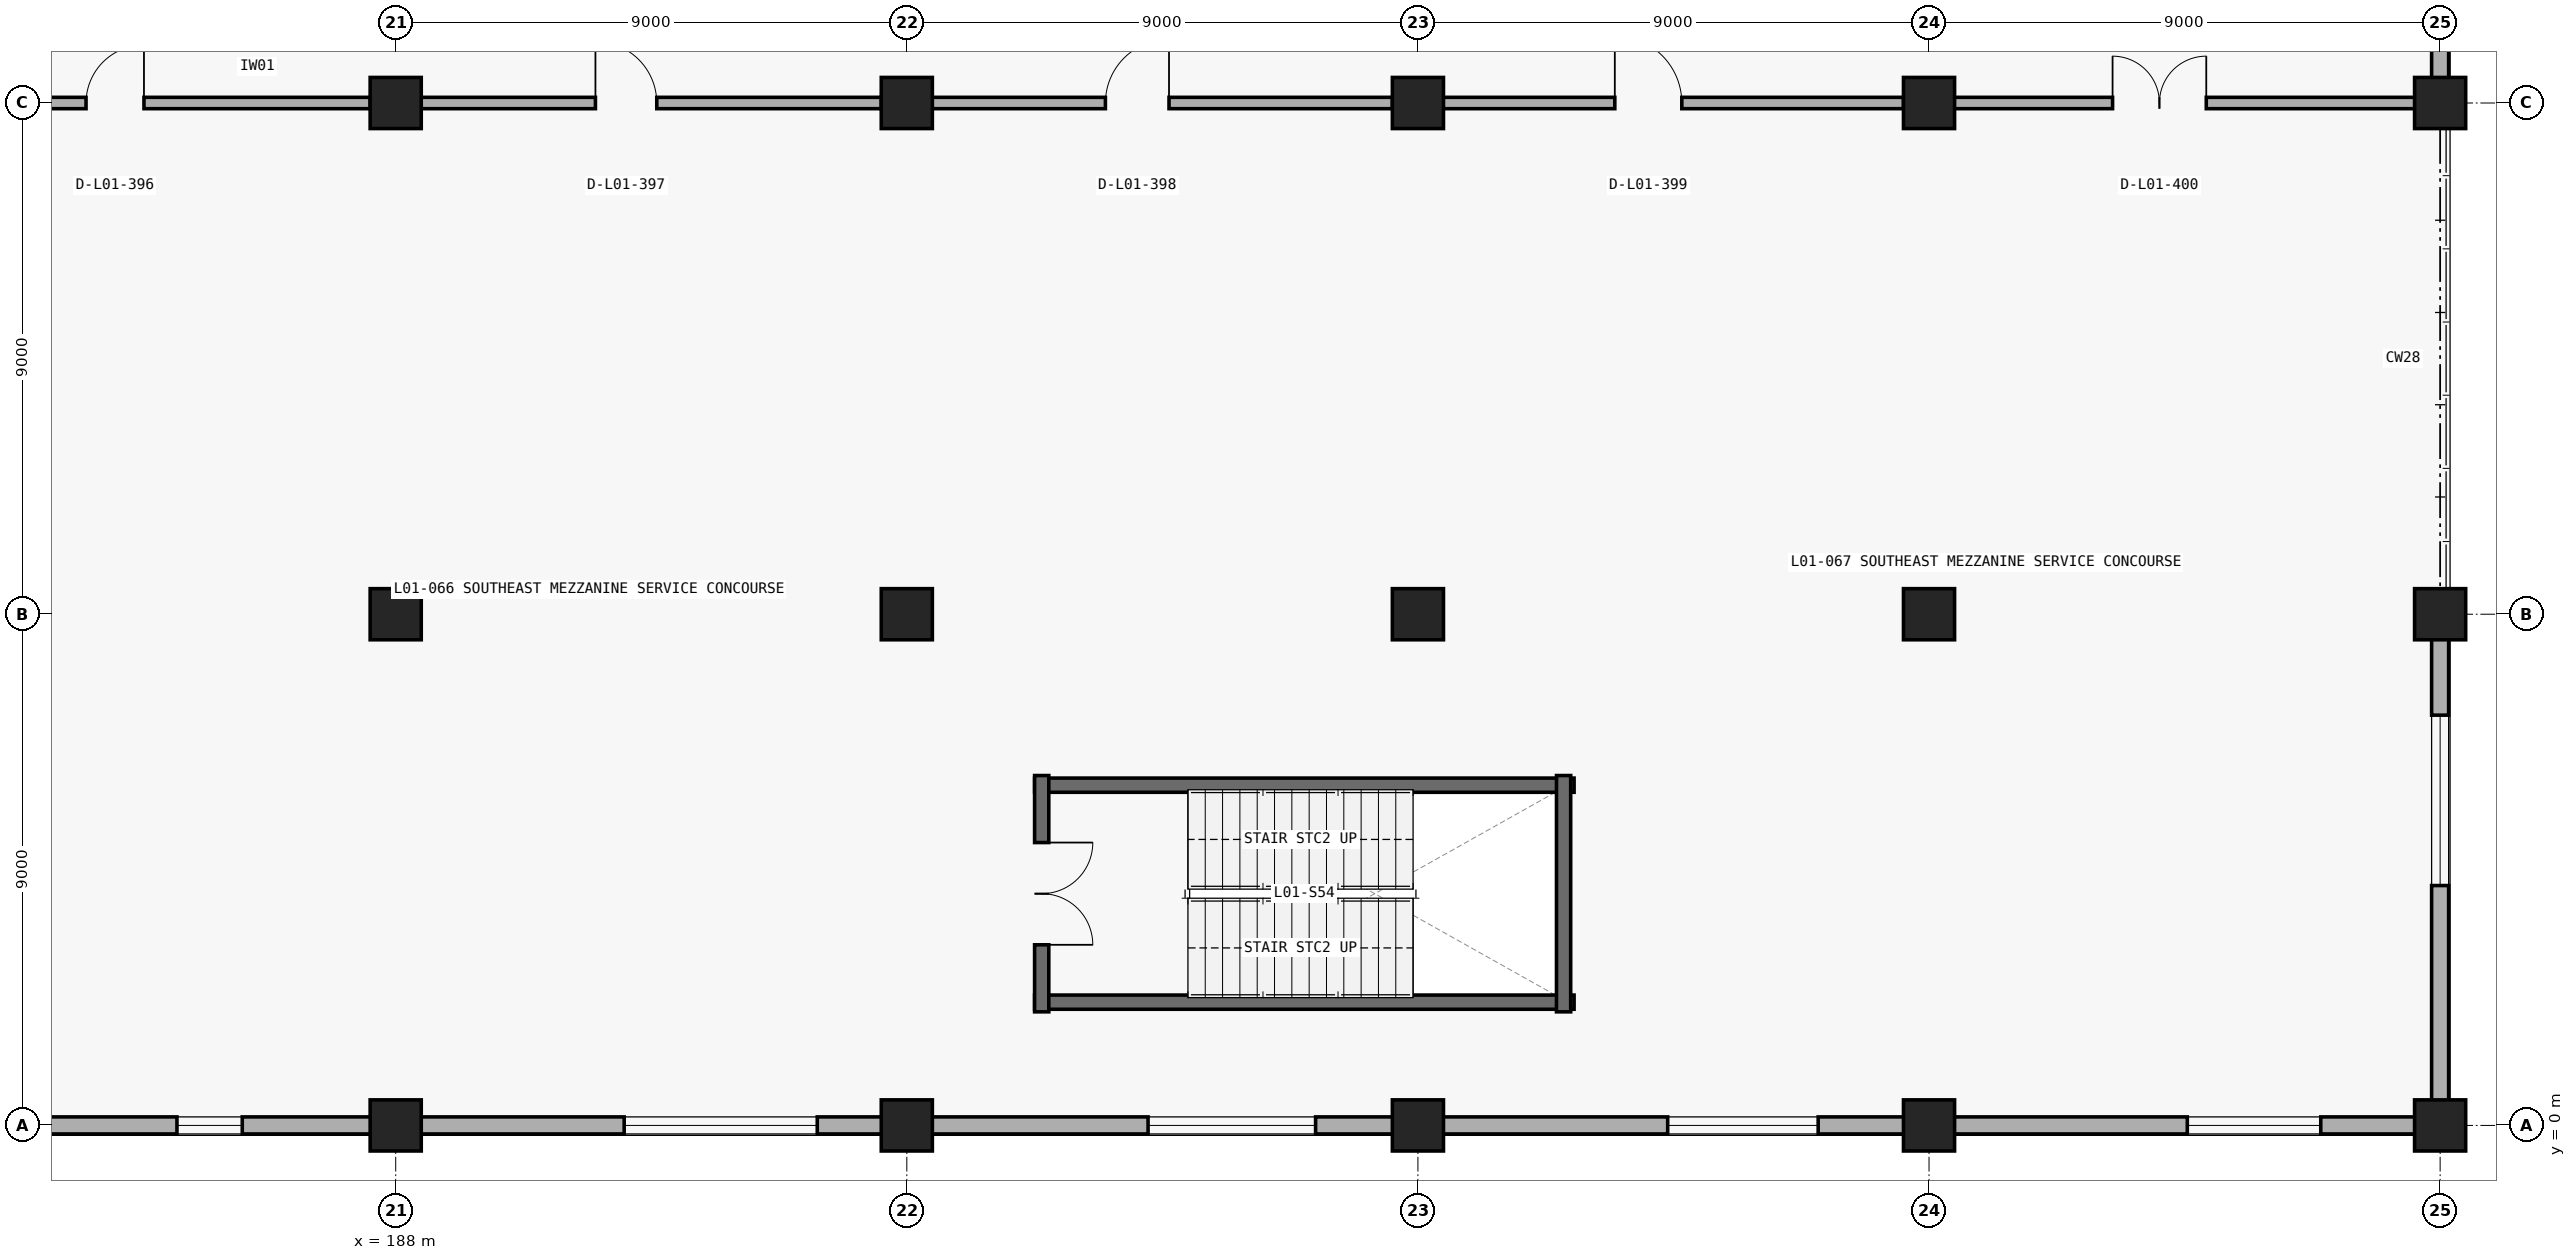
"""IFC4 building model, lengths in metres.
Left out: names, types, materials, properties, quantities, classifications, styles, units other than length and angle.
Written with IfcOpenShell. Run it as: python <this file> out.ifc"""

import sys

from ifc_helpers import new_model, si_unit, direction, frame, frame_2d, origin, origin_2d, place, context, subcontext, project, spatial, rectangle, extrude, element, fill, save


model = new_model("IFC4")
c1 = context("Model", 3, precision=1e-05, world=origin(), true_north=direction((0.0, 1.0)))
c2 = subcontext(c1, "Body", "Model", "MODEL_VIEW")
j1 = project(units=[si_unit("LENGTHUNIT", "METRE"), si_unit("PLANEANGLEUNIT", "RADIAN")], contexts=[c1])
p1 = place(None, origin())
s1 = spatial("IfcSite", under=j1, at=p1, CompositionType="ELEMENT")
p2 = place(p1, origin())
s2 = spatial("IfcBuilding", under=s1, at=p2, CompositionType="ELEMENT")
p3 = place(p2, frame((0.0, 0.0, 5.4)))
s3 = spatial("IfcBuildingStorey", under=s2, at=p3, CompositionType="ELEMENT", Elevation=5.4)
for number, where, z_axis, x_axis in (
    (1, (188.0, 0.0, 0.0), (0.0, 0.0, 1.0), (1.0, 0.0, 0.0)),
    (2, (188.0, 9.0, 0.0), (0.0, 0.0, 1.0), (1.0, 0.0, 0.0)),
    (3, (188.0, 18.0, 0.0), (0.0, 0.0, 1.0), (1.0, 0.0, 0.0)),
    (4, (197.0, 0.0, 0.0), (0.0, 0.0, 1.0), (1.0, 0.0, 0.0)),
    (5, (197.0, 9.0, 0.0), (0.0, 0.0, 1.0), (1.0, 0.0, 0.0)),
    (6, (197.0, 18.0, 0.0), (0.0, 0.0, 1.0), (1.0, 0.0, 0.0)),
    (7, (206.0, 0.0, 0.0), (0.0, 0.0, 1.0), (1.0, 0.0, 0.0)),
    (8, (206.0, 9.0, 0.0), (0.0, 0.0, 1.0), (1.0, 0.0, 0.0)),
    (9, (206.0, 18.0, 0.0), (0.0, 0.0, 1.0), (1.0, 0.0, 0.0)),
    (10, (215.0, 0.0, 0.0), (0.0, 0.0, 1.0), (1.0, 0.0, 0.0)),
    (11, (215.0, 9.0, 0.0), (0.0, 0.0, 1.0), (1.0, 0.0, 0.0)),
    (12, (215.0, 18.0, 0.0), (0.0, 0.0, 1.0), (1.0, 0.0, 0.0)),
    (13, (224.0, 0.0, 0.0), (0.0, 0.0, 1.0), (1.0, 0.0, 0.0)),
    (14, (224.0, 9.0, 0.0), (0.0, 0.0, 1.0), (1.0, 0.0, 0.0)),
    (15, (224.0, 18.0, 0.0), (0.0, 0.0, 1.0), (1.0, 0.0, 0.0)),
):
    element("IfcColumn", number, at=place(p3, frame(where, z_axis=z_axis, x_axis=x_axis)), inside=s3, PredefinedType="COLUMN", context=c2, shape_type="SweptSolid", body=[
        extrude(rectangle(XDim=0.9, YDim=0.9, at=origin_2d()), origin(), (0.0, 0.0, 1.0), 4.8),
    ])
p4 = place(p3, frame((223.575, 0.0, 0.0), z_axis=(0.0, 0.0, 1.0), x_axis=(-1.0, 0.0, 0.0)))
e16 = element("IfcWall", 16, at=p4, inside=s3, PredefinedType="STANDARD", context=c2, shape_type="SweptSolid", body=[
    extrude(rectangle(XDim=8.15, YDim=0.3, at=frame_2d((4.075, 0.0))), origin(), (0.0, 0.0, 1.0), 3.804),
])
p5 = place(p4, frame((1.677, 0.0, 0.95)))
e17 = element("IfcOpeningElement", 17, at=p5, cuts=e16, PredefinedType="OPENING", context=c2, shape_type="SweptSolid", body=[
    extrude(rectangle(XDim=2.35, YDim=2.0, at=frame_2d((1.175, 1.0))), frame((0.0, 0.16, 0.0), z_axis=(0.0, -1.0, 0.0), x_axis=(1.0, 0.0, 0.0)), (0.0, 0.0, 1.0), 0.32),
])
p6 = place(p3, frame((214.575, 0.0, 0.0), z_axis=(0.0, 0.0, 1.0), x_axis=(-1.0, 0.0, 0.0)))
e18 = element("IfcWall", 18, at=p6, inside=s3, PredefinedType="STANDARD", context=c2, shape_type="SweptSolid", body=[
    extrude(rectangle(XDim=8.15, YDim=0.3, at=frame_2d((4.075, 0.0))), origin(), (0.0, 0.0, 1.0), 3.804),
])
p7 = place(p6, frame((1.527, 0.0, 0.95)))
e19 = element("IfcOpeningElement", 19, at=p7, cuts=e18, PredefinedType="OPENING", context=c2, shape_type="SweptSolid", body=[
    extrude(rectangle(XDim=2.65, YDim=2.15, at=frame_2d((1.325, 1.075))), frame((0.0, 0.16, 0.0), z_axis=(0.0, -1.0, 0.0), x_axis=(1.0, 0.0, 0.0)), (0.0, 0.0, 1.0), 0.32),
])
p8 = place(p3, frame((205.575, 0.0, 0.0), z_axis=(0.0, 0.0, 1.0), x_axis=(-1.0, 0.0, 0.0)))
e20 = element("IfcWall", 20, at=p8, inside=s3, PredefinedType="STANDARD", context=c2, shape_type="SweptSolid", body=[
    extrude(rectangle(XDim=8.15, YDim=0.3, at=frame_2d((4.075, 0.0))), origin(), (0.0, 0.0, 1.0), 3.804),
])
p9 = place(p8, frame((1.377, 0.0, 0.95)))
e21 = element("IfcOpeningElement", 21, at=p9, cuts=e20, PredefinedType="OPENING", context=c2, shape_type="SweptSolid", body=[
    extrude(rectangle(XDim=2.95, YDim=2.2, at=frame_2d((1.475, 1.1))), frame((0.0, 0.16, 0.0), z_axis=(0.0, -1.0, 0.0), x_axis=(1.0, 0.0, 0.0)), (0.0, 0.0, 1.0), 0.32),
])
p10 = place(p3, frame((196.575, 0.0, 0.0), z_axis=(0.0, 0.0, 1.0), x_axis=(-1.0, 0.0, 0.0)))
e22 = element("IfcWall", 22, at=p10, inside=s3, PredefinedType="STANDARD", context=c2, shape_type="SweptSolid", body=[
    extrude(rectangle(XDim=8.15, YDim=0.3, at=frame_2d((4.075, 0.0))), origin(), (0.0, 0.0, 1.0), 3.804),
])
p11 = place(p10, frame((1.152, 0.0, 0.95)))
e23 = element("IfcOpeningElement", 23, at=p11, cuts=e22, PredefinedType="OPENING", context=c2, shape_type="SweptSolid", body=[
    extrude(rectangle(XDim=3.4, YDim=2.25, at=frame_2d((1.7, 1.125))), frame((0.0, 0.16, 0.0), z_axis=(0.0, -1.0, 0.0), x_axis=(1.0, 0.0, 0.0)), (0.0, 0.0, 1.0), 0.32),
])
p12 = place(p3, frame((187.575, 0.0, 0.0), z_axis=(0.0, 0.0, 1.0), x_axis=(-1.0, 0.0, 0.0)))
e24 = element("IfcWall", 24, at=p12, inside=s3, PredefinedType="STANDARD", context=c2, shape_type="SweptSolid", body=[
    extrude(rectangle(XDim=8.15, YDim=0.3, at=frame_2d((4.075, 0.0))), origin(), (0.0, 0.0, 1.0), 3.804),
])
p13 = place(p12, frame((2.277, 0.0, 0.95)))
e25 = element("IfcOpeningElement", 25, at=p13, cuts=e24, PredefinedType="OPENING", context=c2, shape_type="SweptSolid", body=[
    extrude(rectangle(XDim=1.15, YDim=1.7, at=frame_2d((0.575, 0.85))), frame((0.0, 0.16, 0.0), z_axis=(0.0, -1.0, 0.0), x_axis=(1.0, 0.0, 0.0)), (0.0, 0.0, 1.0), 0.32),
])
p14 = place(p3, frame((224.0, 26.575, 0.0), z_axis=(0.0, 0.0, 1.0), x_axis=(0.0, -1.0, 0.0)))
e26 = element("IfcWall", 26, at=p14, inside=s3, PredefinedType="STANDARD", context=c2, shape_type="SweptSolid", body=[
    extrude(rectangle(XDim=8.15, YDim=0.3, at=frame_2d((4.075, 0.0))), origin(), (0.0, 0.0, 1.0), 3.837),
])
p15 = place(p14, frame((2.102, 0.0, 0.95)))
e27 = element("IfcOpeningElement", 27, at=p15, cuts=e26, PredefinedType="OPENING", context=c2, shape_type="SweptSolid", body=[
    extrude(rectangle(XDim=1.5, YDim=2.0, at=frame_2d((0.75, 1.0))), frame((0.0, 0.16, 0.0), z_axis=(0.0, -1.0, 0.0), x_axis=(1.0, 0.0, 0.0)), (0.0, 0.0, 1.0), 0.32),
])
p16 = place(p3, frame((224.0, 8.575, 0.0), z_axis=(0.0, 0.0, 1.0), x_axis=(0.0, -1.0, 0.0)))
e28 = element("IfcWall", 28, at=p16, inside=s3, PredefinedType="STANDARD", context=c2, shape_type="SweptSolid", body=[
    extrude(rectangle(XDim=8.15, YDim=0.3, at=frame_2d((4.075, 0.0))), origin(), (0.0, 0.0, 1.0), 3.837),
])
p17 = place(p16, frame((1.352, 0.0, 0.95)))
e29 = element("IfcOpeningElement", 29, at=p17, cuts=e28, PredefinedType="OPENING", context=c2, shape_type="SweptSolid", body=[
    extrude(rectangle(XDim=3.0, YDim=2.3, at=frame_2d((1.5, 1.15))), frame((0.0, 0.16, 0.0), z_axis=(0.0, -1.0, 0.0), x_axis=(1.0, 0.0, 0.0)), (0.0, 0.0, 1.0), 0.32),
])
for number, where, z_axis, x_axis in (
    (30, (199.25, 2.17, 0.0), (0.0, 0.0, 1.0), (1.0, 0.0, 0.0)),
    (31, (208.75, 5.99, 0.0), (0.0, 0.0, 1.0), (-1.0, 0.0, 0.0)),
):
    element("IfcWall", number, at=place(p3, frame(where, z_axis=z_axis, x_axis=x_axis)), inside=s3, PredefinedType="SHEAR", context=c2, shape_type="SweptSolid", body=[
        extrude(rectangle(XDim=9.5, YDim=0.25, at=frame_2d((4.75, 0.0))), origin(), (0.0, 0.0, 1.0), 4.52),
    ])
p18 = place(p3, frame((199.375, 6.16, 0.0), z_axis=(0.0, 0.0, 1.0), x_axis=(0.0, -1.0, 0.0)))
e32 = element("IfcWall", 32, at=p18, inside=s3, PredefinedType="SHEAR", context=c2, shape_type="SweptSolid", body=[
    extrude(rectangle(XDim=4.16, YDim=0.25, at=frame_2d((2.08, 0.0))), origin(), (0.0, 0.0, 1.0), 4.52),
])
p19 = place(p18, frame((1.18, 0.0, 0.0)))
e33 = element("IfcOpeningElement", 33, at=p19, cuts=e32, PredefinedType="OPENING", context=c2, shape_type="SweptSolid", body=[
    extrude(rectangle(XDim=1.8, YDim=2.25, at=frame_2d((0.9, 1.125))), frame((0.0, 0.135, 0.0), z_axis=(0.0, -1.0, 0.0), x_axis=(1.0, 0.0, 0.0)), (0.0, 0.0, 1.0), 0.27),
])
p20 = place(p3, frame((208.565, 2.0, 0.0), z_axis=(0.0, 0.0, 1.0), x_axis=(0.0, 1.0, 0.0)))
e34 = element("IfcWall", 34, at=p20, inside=s3, PredefinedType="SHEAR", context=c2, shape_type="SweptSolid", body=[
    extrude(rectangle(XDim=4.16, YDim=0.25, at=frame_2d((2.08, 0.0))), origin(), (0.0, 0.0, 1.0), 4.52),
])
p21 = place(p3, frame((178.55, 18.0, 0.0), z_axis=(0.0, 0.0, 1.0), x_axis=(1.0, 0.0, 0.0)))
e35 = element("IfcWall", 35, at=p21, inside=s3, PredefinedType="PARTITIONING", context=c2, shape_type="SweptSolid", body=[
    extrude(rectangle(XDim=9.015, YDim=0.2, at=frame_2d((4.507, 0.0))), origin(), (0.0, 0.0, 1.0), 3.804),
])
p22 = place(p21, frame((3.997, 0.0, 0.0)))
e36 = element("IfcOpeningElement", 36, at=p22, cuts=e35, PredefinedType="OPENING", context=c2, shape_type="SweptSolid", body=[
    extrude(rectangle(XDim=1.02, YDim=2.2, at=frame_2d((0.51, 1.1))), frame((0.0, 0.11, 0.0), z_axis=(0.0, -1.0, 0.0), x_axis=(1.0, 0.0, 0.0)), (0.0, 0.0, 1.0), 0.22),
])
p23 = place(p3, frame((187.55, 18.0, 0.0), z_axis=(0.0, 0.0, 1.0), x_axis=(1.0, 0.0, 0.0)))
e37 = element("IfcWall", 37, at=p23, inside=s3, PredefinedType="PARTITIONING", context=c2, shape_type="SweptSolid", body=[
    extrude(rectangle(XDim=9.015, YDim=0.2, at=frame_2d((4.507, 0.0))), origin(), (0.0, 0.0, 1.0), 3.804),
])
p24 = place(p23, frame((3.967, 0.0, 0.0)))
e38 = element("IfcOpeningElement", 38, at=p24, cuts=e37, PredefinedType="OPENING", context=c2, shape_type="SweptSolid", body=[
    extrude(rectangle(XDim=1.08, YDim=2.2, at=frame_2d((0.54, 1.1))), frame((0.0, 0.11, 0.0), z_axis=(0.0, -1.0, 0.0), x_axis=(1.0, 0.0, 0.0)), (0.0, 0.0, 1.0), 0.22),
])
p25 = place(p3, frame((196.55, 18.0, 0.0), z_axis=(0.0, 0.0, 1.0), x_axis=(1.0, 0.0, 0.0)))
e39 = element("IfcWall", 39, at=p25, inside=s3, PredefinedType="PARTITIONING", context=c2, shape_type="SweptSolid", body=[
    extrude(rectangle(XDim=9.015, YDim=0.2, at=frame_2d((4.507, 0.0))), origin(), (0.0, 0.0, 1.0), 3.804),
])
p26 = place(p25, frame((3.947, 0.0, 0.0)))
e40 = element("IfcOpeningElement", 40, at=p26, cuts=e39, PredefinedType="OPENING", context=c2, shape_type="SweptSolid", body=[
    extrude(rectangle(XDim=1.12, YDim=2.25, at=frame_2d((0.56, 1.125))), frame((0.0, 0.11, 0.0), z_axis=(0.0, -1.0, 0.0), x_axis=(1.0, 0.0, 0.0)), (0.0, 0.0, 1.0), 0.22),
])
p27 = place(p3, frame((205.55, 18.0, 0.0), z_axis=(0.0, 0.0, 1.0), x_axis=(1.0, 0.0, 0.0)))
e41 = element("IfcWall", 41, at=p27, inside=s3, PredefinedType="PARTITIONING", context=c2, shape_type="SweptSolid", body=[
    extrude(rectangle(XDim=9.015, YDim=0.2, at=frame_2d((4.507, 0.0))), origin(), (0.0, 0.0, 1.0), 3.804),
])
p28 = place(p27, frame((3.917, 0.0, 0.0)))
e42 = element("IfcOpeningElement", 42, at=p28, cuts=e41, PredefinedType="OPENING", context=c2, shape_type="SweptSolid", body=[
    extrude(rectangle(XDim=1.18, YDim=2.25, at=frame_2d((0.59, 1.125))), frame((0.0, 0.11, 0.0), z_axis=(0.0, -1.0, 0.0), x_axis=(1.0, 0.0, 0.0)), (0.0, 0.0, 1.0), 0.22),
])
p29 = place(p3, frame((214.55, 18.0, 0.0), z_axis=(0.0, 0.0, 1.0), x_axis=(1.0, 0.0, 0.0)))
e43 = element("IfcWall", 43, at=p29, inside=s3, PredefinedType="PARTITIONING", context=c2, shape_type="SweptSolid", body=[
    extrude(rectangle(XDim=9.015, YDim=0.2, at=frame_2d((4.507, 0.0))), origin(), (0.0, 0.0, 1.0), 3.804),
])
p30 = place(p29, frame((3.682, 0.0, 0.0)))
e44 = element("IfcOpeningElement", 44, at=p30, cuts=e43, PredefinedType="OPENING", context=c2, shape_type="SweptSolid", body=[
    extrude(rectangle(XDim=1.65, YDim=2.25, at=frame_2d((0.825, 1.125))), frame((0.0, 0.11, 0.0), z_axis=(0.0, -1.0, 0.0), x_axis=(1.0, 0.0, 0.0)), (0.0, 0.0, 1.0), 0.22),
])
p31 = place(p5, origin())
e45 = element("IfcWindow", 45, at=p31, inside=s3, PartitioningType="SINGLE_PANEL", PredefinedType="WINDOW", context=c2, shape_type="SweptSolid", body=[
    extrude(rectangle(XDim=2.35, YDim=2.0, at=frame_2d((1.175, 1.0))), frame((0.0, 0.03, 0.0), z_axis=(0.0, -1.0, 0.0), x_axis=(1.0, 0.0, 0.0)), (0.0, 0.0, 1.0), 0.06),
])
fill(e17, e45)
p32 = place(p7, origin())
e46 = element("IfcWindow", 46, at=p32, inside=s3, PartitioningType="SINGLE_PANEL", PredefinedType="WINDOW", context=c2, shape_type="SweptSolid", body=[
    extrude(rectangle(XDim=2.65, YDim=2.15, at=frame_2d((1.325, 1.075))), frame((0.0, 0.03, 0.0), z_axis=(0.0, -1.0, 0.0), x_axis=(1.0, 0.0, 0.0)), (0.0, 0.0, 1.0), 0.06),
])
fill(e19, e46)
p33 = place(p9, origin())
e47 = element("IfcWindow", 47, at=p33, inside=s3, PartitioningType="SINGLE_PANEL", PredefinedType="WINDOW", context=c2, shape_type="SweptSolid", body=[
    extrude(rectangle(XDim=2.95, YDim=2.2, at=frame_2d((1.475, 1.1))), frame((0.0, 0.03, 0.0), z_axis=(0.0, -1.0, 0.0), x_axis=(1.0, 0.0, 0.0)), (0.0, 0.0, 1.0), 0.06),
])
fill(e21, e47)
p34 = place(p11, origin())
e48 = element("IfcWindow", 48, at=p34, inside=s3, PartitioningType="SINGLE_PANEL", PredefinedType="WINDOW", context=c2, shape_type="SweptSolid", body=[
    extrude(rectangle(XDim=3.4, YDim=2.25, at=frame_2d((1.7, 1.125))), frame((0.0, 0.03, 0.0), z_axis=(0.0, -1.0, 0.0), x_axis=(1.0, 0.0, 0.0)), (0.0, 0.0, 1.0), 0.06),
])
fill(e23, e48)
p35 = place(p13, origin())
e49 = element("IfcWindow", 49, at=p35, inside=s3, PartitioningType="SINGLE_PANEL", PredefinedType="WINDOW", context=c2, shape_type="SweptSolid", body=[
    extrude(rectangle(XDim=1.15, YDim=1.7, at=frame_2d((0.575, 0.85))), frame((0.0, 0.03, 0.0), z_axis=(0.0, -1.0, 0.0), x_axis=(1.0, 0.0, 0.0)), (0.0, 0.0, 1.0), 0.06),
])
fill(e25, e49)
p36 = place(p17, origin())
e50 = element("IfcWindow", 50, at=p36, inside=s3, PartitioningType="SINGLE_PANEL", PredefinedType="WINDOW", context=c2, shape_type="SweptSolid", body=[
    extrude(rectangle(XDim=3.0, YDim=2.3, at=frame_2d((1.5, 1.15))), frame((0.0, 0.03, 0.0), z_axis=(0.0, -1.0, 0.0), x_axis=(1.0, 0.0, 0.0)), (0.0, 0.0, 1.0), 0.06),
])
fill(e29, e50)
p37 = place(p19, origin())
e51 = element("IfcDoor", 51, at=p37, inside=s3, OperationType="DOUBLE_DOOR_SINGLE_SWING", PredefinedType="DOOR", context=c2, shape_type="SweptSolid", body=[
    extrude(rectangle(XDim=1.8, YDim=2.25, at=frame_2d((0.9, 1.125))), frame((0.0, 0.025, 0.0), z_axis=(0.0, -1.0, 0.0), x_axis=(1.0, 0.0, 0.0)), (0.0, 0.0, 1.0), 0.05),
])
fill(e33, e51)
p38 = place(p22, origin())
e52 = element("IfcDoor", 52, at=p38, inside=s3, OperationType="SINGLE_SWING_RIGHT", PredefinedType="DOOR", context=c2, shape_type="SweptSolid", body=[
    extrude(rectangle(XDim=1.02, YDim=2.2, at=frame_2d((0.51, 1.1))), frame((0.0, 0.025, 0.0), z_axis=(0.0, -1.0, 0.0), x_axis=(1.0, 0.0, 0.0)), (0.0, 0.0, 1.0), 0.05),
])
fill(e36, e52)
p39 = place(p24, origin())
e53 = element("IfcDoor", 53, at=p39, inside=s3, OperationType="SINGLE_SWING_LEFT", PredefinedType="DOOR", context=c2, shape_type="SweptSolid", body=[
    extrude(rectangle(XDim=1.08, YDim=2.2, at=frame_2d((0.54, 1.1))), frame((0.0, 0.025, 0.0), z_axis=(0.0, -1.0, 0.0), x_axis=(1.0, 0.0, 0.0)), (0.0, 0.0, 1.0), 0.05),
])
fill(e38, e53)
p40 = place(p26, origin())
e54 = element("IfcDoor", 54, at=p40, inside=s3, OperationType="SINGLE_SWING_RIGHT", PredefinedType="DOOR", context=c2, shape_type="SweptSolid", body=[
    extrude(rectangle(XDim=1.12, YDim=2.25, at=frame_2d((0.56, 1.125))), frame((0.0, 0.025, 0.0), z_axis=(0.0, -1.0, 0.0), x_axis=(1.0, 0.0, 0.0)), (0.0, 0.0, 1.0), 0.05),
])
fill(e40, e54)
p41 = place(p28, origin())
e55 = element("IfcDoor", 55, at=p41, inside=s3, OperationType="SINGLE_SWING_LEFT", PredefinedType="DOOR", context=c2, shape_type="SweptSolid", body=[
    extrude(rectangle(XDim=1.18, YDim=2.25, at=frame_2d((0.59, 1.125))), frame((0.0, 0.025, 0.0), z_axis=(0.0, -1.0, 0.0), x_axis=(1.0, 0.0, 0.0)), (0.0, 0.0, 1.0), 0.05),
])
fill(e42, e55)
p42 = place(p30, origin())
e56 = element("IfcDoor", 56, at=p42, inside=s3, OperationType="DOUBLE_DOOR_SINGLE_SWING", PredefinedType="DOOR", context=c2, shape_type="SweptSolid", body=[
    extrude(rectangle(XDim=1.65, YDim=2.25, at=frame_2d((0.825, 1.125))), frame((0.0, 0.025, 0.0), z_axis=(0.0, -1.0, 0.0), x_axis=(1.0, 0.0, 0.0)), (0.0, 0.0, 1.0), 0.05),
])
fill(e44, e56)
save(model, sys.argv[1])
